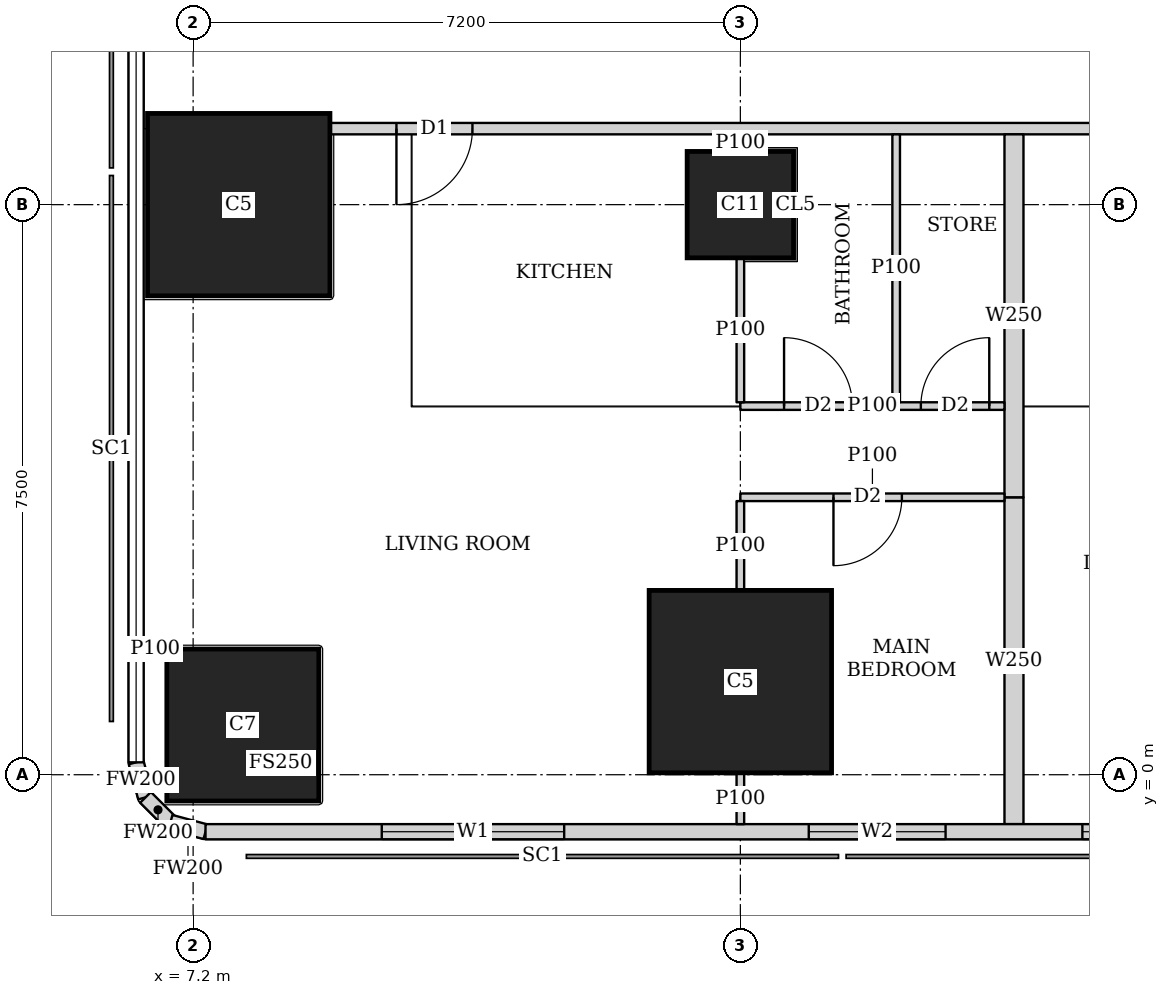
"""IFC4 building model, lengths in metres.
Left out: names, types, materials, properties, quantities, classifications, styles, units other than length and angle.
Written with IfcOpenShell. Run it as: python <this file> out.ifc"""

import sys

from ifc_helpers import new_model, si_unit, direction, frame, frame_2d, origin, origin_2d, place, context, subcontext, project, spatial, rectangle, extrude, element, fill, save


model = new_model("IFC4")
c1 = context("Model", 3, precision=1e-05, world=origin(), true_north=direction((0.0, 1.0)))
c2 = subcontext(c1, "Body", "Model", "MODEL_VIEW")
j1 = project(units=[si_unit("LENGTHUNIT", "METRE"), si_unit("PLANEANGLEUNIT", "RADIAN")], contexts=[c1])
p1 = place(None, origin())
s1 = spatial("IfcSite", under=j1, at=p1, CompositionType="ELEMENT")
p2 = place(p1, origin())
s2 = spatial("IfcBuilding", under=s1, at=p2, CompositionType="ELEMENT")
p3 = place(p2, frame((0.0, 0.0, 208.7)))
s3 = spatial("IfcBuildingStorey", under=s2, at=p3, CompositionType="ELEMENT", Elevation=208.7)
p4 = place(p3, frame((7.854, 0.654, 0.0), z_axis=(0.0, 0.0, 1.0), x_axis=(1.0, 0.0, 0.0)))
e1 = element("IfcColumn", 1, at=p4, inside=s3, PredefinedType="COLUMN", context=c2, shape_type="SweptSolid", body=[
    extrude(rectangle(XDim=2.0, YDim=2.0, at=origin_2d()), origin(), (0.0, 0.0, 1.0), 3.75),
])
for number, where, z_axis, x_axis in (
    (2, (14.4, 1.225, 0.0), (0.0, 0.0, 1.0), (1.0, 0.0, 0.0)),
    (3, (7.8, 7.5, 0.0), (0.0, 0.0, 1.0), (1.0, 0.0, 0.0)),
):
    element("IfcColumn", number, at=place(p3, frame(where, z_axis=z_axis, x_axis=x_axis)), inside=s3, PredefinedType="COLUMN", context=c2, shape_type="SweptSolid", body=[
        extrude(rectangle(XDim=2.4, YDim=2.4, at=origin_2d()), origin(), (0.0, 0.0, 1.0), 3.75),
    ])
p5 = place(p3, frame((14.4, 7.5, 0.0), z_axis=(0.0, 0.0, 1.0), x_axis=(1.0, 0.0, 0.0)))
e4 = element("IfcColumn", 4, at=p5, inside=s3, PredefinedType="COLUMN", context=c2, shape_type="SweptSolid", body=[
    extrude(rectangle(XDim=1.4, YDim=1.4, at=origin_2d()), origin(), (0.0, 0.0, 1.0), 3.75),
])
p6 = place(p3, frame((7.363, -0.75, 0.0), z_axis=(0.0, 0.0, 1.0), x_axis=(1.0, 0.0, 0.0)))
e5 = element("IfcWall", 5, at=p6, inside=s3, PredefinedType="SOLIDWALL", context=c2, shape_type="SweptSolid", body=[
    extrude(rectangle(XDim=40.428, YDim=0.2, at=frame_2d((20.214, 0.0))), origin(), (0.0, 0.0, 1.0), 3.5),
])
p7 = place(p6, frame((2.319, 0.0, 0.9)))
e6 = element("IfcOpeningElement", 6, at=p7, cuts=e5, PredefinedType="OPENING", context=c2, shape_type="SweptSolid", body=[
    extrude(rectangle(XDim=2.4, YDim=1.5, at=frame_2d((1.2, 0.75))), frame((0.0, 0.11, 0.0), z_axis=(0.0, -1.0, 0.0), x_axis=(1.0, 0.0, 0.0)), (0.0, 0.0, 1.0), 0.22),
])
p8 = place(p6, frame((7.937, 0.0, 0.9)))
e7 = element("IfcOpeningElement", 7, at=p8, cuts=e5, PredefinedType="OPENING", context=c2, shape_type="SweptSolid", body=[
    extrude(rectangle(XDim=1.8, YDim=1.5, at=frame_2d((0.9, 0.75))), frame((0.0, 0.11, 0.0), z_axis=(0.0, -1.0, 0.0), x_axis=(1.0, 0.0, 0.0)), (0.0, 0.0, 1.0), 0.22),
])
p9 = place(p6, frame((11.537, 0.0, 0.9)))
e8 = element("IfcOpeningElement", 8, at=p9, cuts=e5, PredefinedType="OPENING", context=c2, shape_type="SweptSolid", body=[
    extrude(rectangle(XDim=1.8, YDim=1.5, at=frame_2d((0.9, 0.75))), frame((0.0, 0.11, 0.0), z_axis=(0.0, -1.0, 0.0), x_axis=(1.0, 0.0, 0.0)), (0.0, 0.0, 1.0), 0.22),
])
p10 = place(p6, frame((15.137, 0.0, 0.9)))
e9 = element("IfcOpeningElement", 9, at=p10, cuts=e5, PredefinedType="OPENING", context=c2, shape_type="SweptSolid", body=[
    extrude(rectangle(XDim=1.8, YDim=1.5, at=frame_2d((0.9, 0.75))), frame((0.0, 0.11, 0.0), z_axis=(0.0, -1.0, 0.0), x_axis=(1.0, 0.0, 0.0)), (0.0, 0.0, 1.0), 0.22),
])
p11 = place(p6, frame((18.737, 0.0, 0.9)))
e10 = element("IfcOpeningElement", 10, at=p11, cuts=e5, PredefinedType="OPENING", context=c2, shape_type="SweptSolid", body=[
    extrude(rectangle(XDim=1.8, YDim=1.5, at=frame_2d((0.9, 0.75))), frame((0.0, 0.11, 0.0), z_axis=(0.0, -1.0, 0.0), x_axis=(1.0, 0.0, 0.0)), (0.0, 0.0, 1.0), 0.22),
])
p12 = place(p6, frame((22.337, 0.0, 0.9)))
e11 = element("IfcOpeningElement", 11, at=p12, cuts=e5, PredefinedType="OPENING", context=c2, shape_type="SweptSolid", body=[
    extrude(rectangle(XDim=1.8, YDim=1.5, at=frame_2d((0.9, 0.75))), frame((0.0, 0.11, 0.0), z_axis=(0.0, -1.0, 0.0), x_axis=(1.0, 0.0, 0.0)), (0.0, 0.0, 1.0), 0.22),
])
p13 = place(p6, frame((25.937, 0.0, 0.9)))
e12 = element("IfcOpeningElement", 12, at=p13, cuts=e5, PredefinedType="OPENING", context=c2, shape_type="SweptSolid", body=[
    extrude(rectangle(XDim=1.8, YDim=1.5, at=frame_2d((0.9, 0.75))), frame((0.0, 0.11, 0.0), z_axis=(0.0, -1.0, 0.0), x_axis=(1.0, 0.0, 0.0)), (0.0, 0.0, 1.0), 0.22),
])
p14 = place(p6, frame((29.537, 0.0, 0.9)))
e13 = element("IfcOpeningElement", 13, at=p14, cuts=e5, PredefinedType="OPENING", context=c2, shape_type="SweptSolid", body=[
    extrude(rectangle(XDim=1.8, YDim=1.5, at=frame_2d((0.9, 0.75))), frame((0.0, 0.11, 0.0), z_axis=(0.0, -1.0, 0.0), x_axis=(1.0, 0.0, 0.0)), (0.0, 0.0, 1.0), 0.22),
])
p15 = place(p3, frame((6.45, 0.163, 0.0), z_axis=(0.0, 0.0, 1.0), x_axis=(0.259698463175, -0.965689757751, 0.0)))
e14 = element("IfcWall", 14, at=p15, inside=s3, PredefinedType="SOLIDWALL", context=c2, shape_type="SweptSolid", body=[
    extrude(rectangle(XDim=0.478, YDim=0.2, at=frame_2d((0.239, 0.0))), origin(), (0.0, 0.0, 1.0), 3.5),
])
p16 = place(p3, frame((6.574, -0.298, 0.0), z_axis=(0.0, 0.0, 1.0), x_axis=(0.707369890659, -0.706843573776, 0.0)))
e15 = element("IfcWall", 15, at=p16, inside=s3, PredefinedType="SOLIDWALL", context=c2, shape_type="SweptSolid", body=[
    extrude(rectangle(XDim=0.464, YDim=0.2, at=frame_2d((0.232, 0.0))), origin(), (0.0, 0.0, 1.0), 3.5),
])
p17 = place(p3, frame((6.902, -0.626, 0.0), z_axis=(0.0, 0.0, 1.0), x_axis=(0.965655254015, -0.259826731483, 0.0)))
e16 = element("IfcWall", 16, at=p17, inside=s3, PredefinedType="SOLIDWALL", context=c2, shape_type="SweptSolid", body=[
    extrude(rectangle(XDim=0.477, YDim=0.2, at=frame_2d((0.239, 0.0))), origin(), (0.0, 0.0, 1.0), 3.5),
])
p18 = place(p3, frame((40.053, 8.5, 0.0), z_axis=(0.0, 0.0, 1.0), x_axis=(-1.0, 0.0, 0.0)))
e17 = element("IfcWall", 17, at=p18, inside=s3, PredefinedType="SOLIDWALL", context=c2, shape_type="SweptSolid", body=[
    extrude(rectangle(XDim=31.052, YDim=0.15, at=frame_2d((15.526, 0.0))), origin(), (0.0, 0.0, 1.0), 3.5),
])
p19 = place(p18, frame((29.178, 0.0, 0.0)))
e18 = element("IfcOpeningElement", 18, at=p19, cuts=e17, PredefinedType="OPENING", context=c2, shape_type="SweptSolid", body=[
    extrude(rectangle(XDim=1.0, YDim=2.1, at=frame_2d((0.5, 1.05))), frame((0.0, 0.085, 0.0), z_axis=(0.0, -1.0, 0.0), x_axis=(1.0, 0.0, 0.0)), (0.0, 0.0, 1.0), 0.17),
])
p20 = place(p18, frame((19.953, 0.0, 0.0)))
e19 = element("IfcOpeningElement", 19, at=p20, cuts=e17, PredefinedType="OPENING", context=c2, shape_type="SweptSolid", body=[
    extrude(rectangle(XDim=1.0, YDim=2.1, at=frame_2d((0.5, 1.05))), frame((0.0, 0.085, 0.0), z_axis=(0.0, -1.0, 0.0), x_axis=(1.0, 0.0, 0.0)), (0.0, 0.0, 1.0), 0.17),
])
p21 = place(p18, frame((12.753, 0.0, 0.0)))
e20 = element("IfcOpeningElement", 20, at=p21, cuts=e17, PredefinedType="OPENING", context=c2, shape_type="SweptSolid", body=[
    extrude(rectangle(XDim=1.0, YDim=2.1, at=frame_2d((0.5, 1.05))), frame((0.0, 0.085, 0.0), z_axis=(0.0, -1.0, 0.0), x_axis=(1.0, 0.0, 0.0)), (0.0, 0.0, 1.0), 0.17),
])
p22 = place(p18, frame((0.15, 0.0, 0.0)))
e21 = element("IfcOpeningElement", 21, at=p22, cuts=e17, PredefinedType="OPENING", context=c2, shape_type="SweptSolid", body=[
    extrude(rectangle(XDim=1.0, YDim=2.1, at=frame_2d((0.5, 1.05))), frame((0.0, 0.085, 0.0), z_axis=(0.0, -1.0, 0.0), x_axis=(1.0, 0.0, 0.0)), (0.0, 0.0, 1.0), 0.17),
])
p23 = place(p3, frame((6.55, 1.654, 0.0), z_axis=(0.0, 0.0, 1.0), x_axis=(1.0, 0.0, 0.0)))
e22 = element("IfcWall", 22, at=p23, inside=s3, PredefinedType="PARTITIONING", context=c2, shape_type="SweptSolid", body=[
    extrude(rectangle(XDim=0.304, YDim=0.1, at=frame_2d((0.152, 0.0))), origin(), (0.0, 0.0, 1.0), 2.05),
])
p24 = place(p3, frame((17.875, 3.65, 0.0), z_axis=(0.0, 0.0, 1.0), x_axis=(-1.0, 0.0, 0.0)))
e23 = element("IfcWall", 23, at=p24, inside=s3, PredefinedType="PARTITIONING", context=c2, shape_type="SweptSolid", body=[
    extrude(rectangle(XDim=3.475, YDim=0.1, at=frame_2d((1.738, 0.0))), origin(), (0.0, 0.0, 1.0), 3.5),
])
p25 = place(p24, frame((1.35, 0.0, 0.0)))
e24 = element("IfcOpeningElement", 24, at=p25, cuts=e23, PredefinedType="OPENING", context=c2, shape_type="SweptSolid", body=[
    extrude(rectangle(XDim=0.9, YDim=2.1, at=frame_2d((0.45, 1.05))), frame((0.0, 0.06, 0.0), z_axis=(0.0, -1.0, 0.0), x_axis=(1.0, 0.0, 0.0)), (0.0, 0.0, 1.0), 0.12),
])
p26 = place(p3, frame((17.875, 4.85, 0.0), z_axis=(0.0, 0.0, 1.0), x_axis=(-1.0, 0.0, 0.0)))
e25 = element("IfcWall", 25, at=p26, inside=s3, PredefinedType="PARTITIONING", context=c2, shape_type="SweptSolid", body=[
    extrude(rectangle(XDim=3.475, YDim=0.1, at=frame_2d((1.738, 0.0))), origin(), (0.0, 0.0, 1.0), 3.5),
])
p27 = place(p26, frame((2.0, 0.0, 0.0)))
e26 = element("IfcOpeningElement", 26, at=p27, cuts=e25, PredefinedType="OPENING", context=c2, shape_type="SweptSolid", body=[
    extrude(rectangle(XDim=0.9, YDim=2.1, at=frame_2d((0.45, 1.05))), frame((0.0, 0.06, 0.0), z_axis=(0.0, -1.0, 0.0), x_axis=(1.0, 0.0, 0.0)), (0.0, 0.0, 1.0), 0.12),
])
p28 = place(p26, frame((0.2, 0.0, 0.0)))
e27 = element("IfcOpeningElement", 27, at=p28, cuts=e25, PredefinedType="OPENING", context=c2, shape_type="SweptSolid", body=[
    extrude(rectangle(XDim=0.9, YDim=2.1, at=frame_2d((0.45, 1.05))), frame((0.0, 0.06, 0.0), z_axis=(0.0, -1.0, 0.0), x_axis=(1.0, 0.0, 0.0)), (0.0, 0.0, 1.0), 0.12),
])
p29 = place(p3, frame((14.4, -0.65, 0.0), z_axis=(0.0, 0.0, 1.0), x_axis=(0.0, 1.0, 0.0)))
e28 = element("IfcWall", 28, at=p29, inside=s3, PredefinedType="PARTITIONING", context=c2, shape_type="SweptSolid", body=[
    extrude(rectangle(XDim=0.674, YDim=0.1, at=frame_2d((0.337, 0.0))), origin(), (0.0, 0.0, 1.0), 3.5),
])
p30 = place(p3, frame((14.4, 2.426, 0.0), z_axis=(0.0, 0.0, 1.0), x_axis=(0.0, 1.0, 0.0)))
e29 = element("IfcWall", 29, at=p30, inside=s3, PredefinedType="PARTITIONING", context=c2, shape_type="SweptSolid", body=[
    extrude(rectangle(XDim=1.174, YDim=0.1, at=frame_2d((0.587, 0.0))), origin(), (0.0, 0.0, 1.0), 3.5),
])
p31 = place(p3, frame((14.4, 4.9, 0.0), z_axis=(0.0, 0.0, 1.0), x_axis=(0.0, 1.0, 0.0)))
e30 = element("IfcWall", 30, at=p31, inside=s3, PredefinedType="PARTITIONING", context=c2, shape_type="SweptSolid", body=[
    extrude(rectangle(XDim=1.899, YDim=0.1, at=frame_2d((0.95, 0.0))), origin(), (0.0, 0.0, 1.0), 3.5),
])
p32 = place(p3, frame((14.4, 8.201, 0.0), z_axis=(0.0, 0.0, 1.0), x_axis=(0.0, 1.0, 0.0)))
e31 = element("IfcWall", 31, at=p32, inside=s3, PredefinedType="PARTITIONING", context=c2, shape_type="SweptSolid", body=[
    extrude(rectangle(XDim=0.224, YDim=0.1, at=frame_2d((0.112, 0.0))), origin(), (0.0, 0.0, 1.0), 3.5),
])
p33 = place(p3, frame((16.45, 4.9, 0.0), z_axis=(0.0, 0.0, 1.0), x_axis=(0.0, 1.0, 0.0)))
e32 = element("IfcWall", 32, at=p33, inside=s3, PredefinedType="PARTITIONING", context=c2, shape_type="SweptSolid", body=[
    extrude(rectangle(XDim=3.525, YDim=0.1, at=frame_2d((1.763, 0.0))), origin(), (0.0, 0.0, 1.0), 3.5),
])
p34 = place(p3, frame((18.0, -0.65, 0.0), z_axis=(0.0, 0.0, 1.0), x_axis=(0.0, 1.0, 0.0)))
e33 = element("IfcWall", 33, at=p34, inside=s3, PredefinedType="SOLIDWALL", context=c2, shape_type="SweptSolid", body=[
    extrude(rectangle(XDim=4.3, YDim=0.25, at=frame_2d((2.15, 0.0))), origin(), (0.0, 0.0, 1.0), 2.05),
])
p35 = place(p3, frame((18.0, 3.65, 0.0), z_axis=(0.0, 0.0, 1.0), x_axis=(0.0, 1.0, 0.0)))
e34 = element("IfcWall", 34, at=p35, inside=s3, PredefinedType="SOLIDWALL", context=c2, shape_type="SweptSolid", body=[
    extrude(rectangle(XDim=4.775, YDim=0.25, at=frame_2d((2.388, 0.0))), origin(), (0.0, 0.0, 1.0), 3.5),
])
p36 = place(p7, origin())
e35 = element("IfcWindow", 35, at=p36, inside=s3, PartitioningType="SINGLE_PANEL", PredefinedType="WINDOW", context=c2, shape_type="SweptSolid", body=[
    extrude(rectangle(XDim=2.4, YDim=1.5, at=frame_2d((1.2, 0.75))), frame((0.0, 0.03, 0.0), z_axis=(0.0, -1.0, 0.0), x_axis=(1.0, 0.0, 0.0)), (0.0, 0.0, 1.0), 0.06),
])
fill(e6, e35)
p37 = place(p8, origin())
e36 = element("IfcWindow", 36, at=p37, inside=s3, PartitioningType="SINGLE_PANEL", PredefinedType="WINDOW", context=c2, shape_type="SweptSolid", body=[
    extrude(rectangle(XDim=1.8, YDim=1.5, at=frame_2d((0.9, 0.75))), frame((0.0, 0.03, 0.0), z_axis=(0.0, -1.0, 0.0), x_axis=(1.0, 0.0, 0.0)), (0.0, 0.0, 1.0), 0.06),
])
fill(e7, e36)
p38 = place(p9, origin())
e37 = element("IfcWindow", 37, at=p38, inside=s3, PartitioningType="SINGLE_PANEL", PredefinedType="WINDOW", context=c2, shape_type="SweptSolid", body=[
    extrude(rectangle(XDim=1.8, YDim=1.5, at=frame_2d((0.9, 0.75))), frame((0.0, 0.03, 0.0), z_axis=(0.0, -1.0, 0.0), x_axis=(1.0, 0.0, 0.0)), (0.0, 0.0, 1.0), 0.06),
])
fill(e8, e37)
p39 = place(p25, origin())
e38 = element("IfcDoor", 38, at=p39, inside=s3, OperationType="SINGLE_SWING_RIGHT", PredefinedType="DOOR", context=c2, shape_type="SweptSolid", body=[
    extrude(rectangle(XDim=0.9, YDim=2.1, at=frame_2d((0.45, 1.05))), frame((0.0, 0.025, 0.0), z_axis=(0.0, -1.0, 0.0), x_axis=(1.0, 0.0, 0.0)), (0.0, 0.0, 1.0), 0.05),
])
fill(e24, e38)
p40 = place(p27, origin())
e39 = element("IfcDoor", 39, at=p40, inside=s3, OperationType="SINGLE_SWING_LEFT", PredefinedType="DOOR", context=c2, shape_type="SweptSolid", body=[
    extrude(rectangle(XDim=0.9, YDim=2.1, at=frame_2d((0.45, 1.05))), frame((0.0, 0.025, 0.0), z_axis=(0.0, -1.0, 0.0), x_axis=(1.0, 0.0, 0.0)), (0.0, 0.0, 1.0), 0.05),
])
fill(e26, e39)
p41 = place(p28, origin())
e40 = element("IfcDoor", 40, at=p41, inside=s3, OperationType="SINGLE_SWING_RIGHT", PredefinedType="DOOR", context=c2, shape_type="SweptSolid", body=[
    extrude(rectangle(XDim=0.9, YDim=2.1, at=frame_2d((0.45, 1.05))), frame((0.0, 0.025, 0.0), z_axis=(0.0, -1.0, 0.0), x_axis=(1.0, 0.0, 0.0)), (0.0, 0.0, 1.0), 0.05),
])
fill(e27, e40)
p42 = place(p19, origin())
e41 = element("IfcDoor", 41, at=p42, inside=s3, OperationType="SINGLE_SWING_RIGHT", PredefinedType="DOOR", context=c2, shape_type="SweptSolid", body=[
    extrude(rectangle(XDim=1.0, YDim=2.1, at=frame_2d((0.5, 1.05))), frame((0.0, 0.025, 0.0), z_axis=(0.0, -1.0, 0.0), x_axis=(1.0, 0.0, 0.0)), (0.0, 0.0, 1.0), 0.05),
])
fill(e18, e41)
save(model, sys.argv[1])
